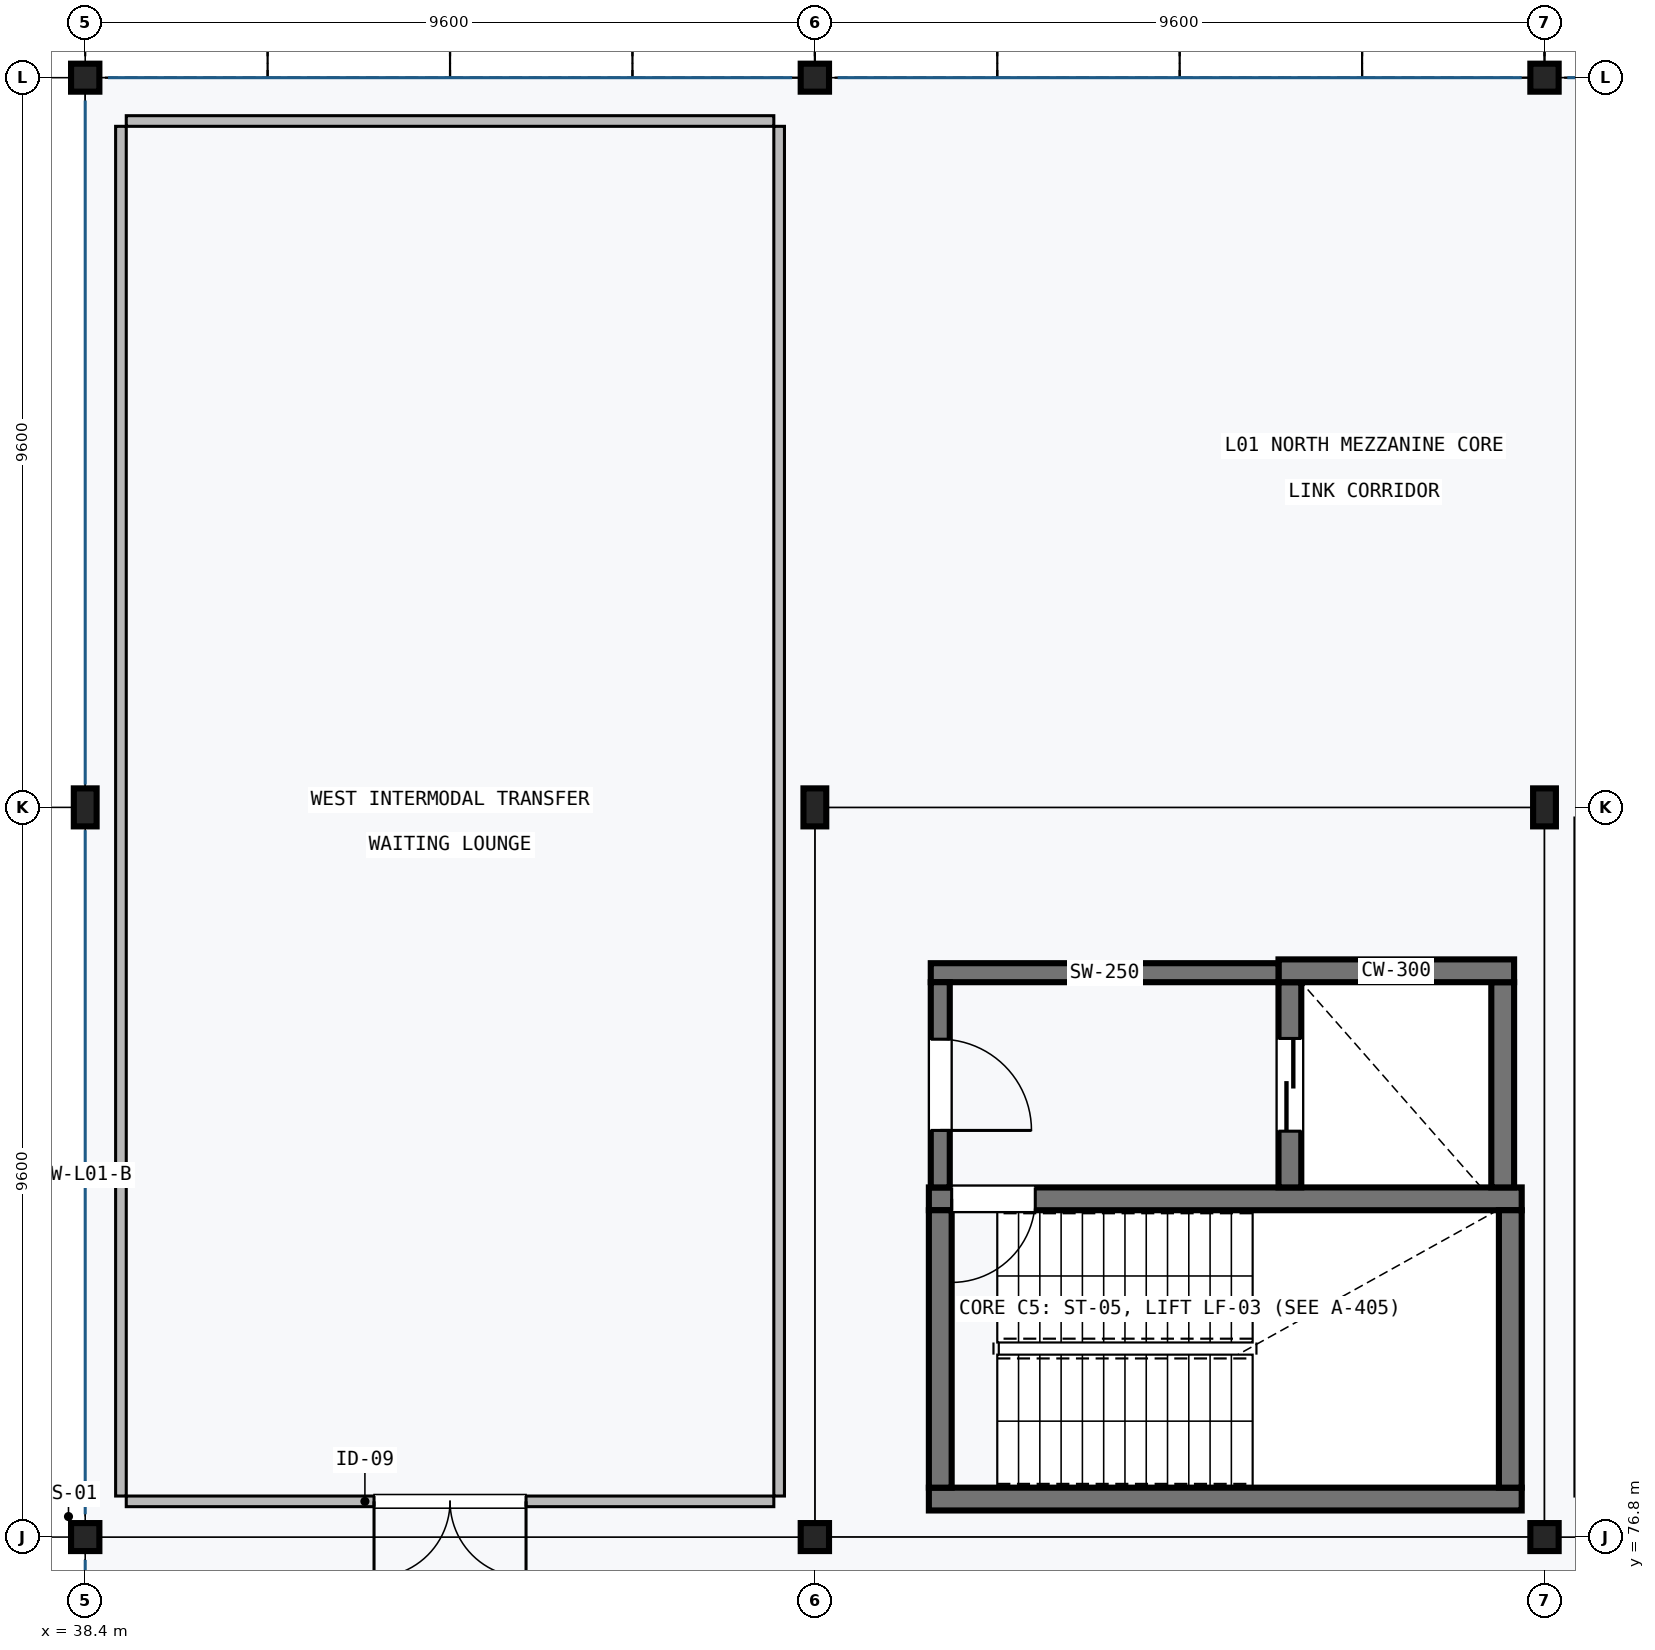
"""IFC4 building model, lengths in metres.
Left out: names, types, materials, properties, quantities, classifications, styles, units other than length and angle.
Written with IfcOpenShell. Run it as: python <this file> out.ifc"""

import sys

from ifc_helpers import new_model, si_unit, direction, frame, frame_2d, origin, origin_2d, place, context, subcontext, project, spatial, rectangle, i_section, extrude, element, fill, save


model = new_model("IFC4")
c1 = context("Model", 3, precision=1e-05, world=origin(), true_north=direction((0.0, 1.0)))
c2 = subcontext(c1, "Body", "Model", "MODEL_VIEW")
j1 = project(units=[si_unit("LENGTHUNIT", "METRE"), si_unit("PLANEANGLEUNIT", "RADIAN")], contexts=[c1])
p1 = place(None, origin())
s1 = spatial("IfcSite", under=j1, at=p1, CompositionType="ELEMENT")
p2 = place(p1, origin())
s2 = spatial("IfcBuilding", under=s1, at=p2, CompositionType="ELEMENT")
p3 = place(p2, frame((0.0, 0.0, 6.0)))
s3 = spatial("IfcBuildingStorey", under=s2, at=p3, CompositionType="ELEMENT", Elevation=6.0)
p4 = place(p3, frame((38.4, 76.8, 0.0), z_axis=(0.0, 0.0, 1.0), x_axis=(1.0, 0.0, 0.0)))
e1 = element("IfcColumn", 1, at=p4, inside=s3, PredefinedType="COLUMN", context=c2, shape_type="SweptSolid", body=[
    extrude(i_section(OverallWidth=0.373, OverallDepth=0.368, WebThickness=0.014, FlangeThickness=0.024, FilletRadius=0.015, at=origin_2d()), origin(), (0.0, 0.0, 1.0), 4.25),
])
p5 = place(p3, frame((38.4, 86.4, 0.0), z_axis=(0.0, 0.0, 1.0), x_axis=(1.0, 0.0, 0.0)))
e2 = element("IfcColumn", 2, at=p5, inside=s3, PredefinedType="COLUMN", context=c2, shape_type="SweptSolid", body=[
    extrude(i_section(OverallWidth=0.3, OverallDepth=0.5, WebThickness=0.014, FlangeThickness=0.028, FilletRadius=0.027, at=origin_2d()), origin(), (0.0, 0.0, 1.0), 4.25),
])
for number, where, z_axis, x_axis in (
    (3, (38.4, 96.0, 0.0), (0.0, 0.0, 1.0), (1.0, 0.0, 0.0)),
    (4, (48.0, 76.8, 0.0), (0.0, 0.0, 1.0), (1.0, 0.0, 0.0)),
):
    element("IfcColumn", number, at=place(p3, frame(where, z_axis=z_axis, x_axis=x_axis)), inside=s3, PredefinedType="COLUMN", context=c2, shape_type="SweptSolid", body=[
        extrude(i_section(OverallWidth=0.373, OverallDepth=0.368, WebThickness=0.014, FlangeThickness=0.024, FilletRadius=0.015, at=origin_2d()), origin(), (0.0, 0.0, 1.0), 4.25),
    ])
p6 = place(p3, frame((48.0, 86.4, 0.0), z_axis=(0.0, 0.0, 1.0), x_axis=(1.0, 0.0, 0.0)))
e5 = element("IfcColumn", 5, at=p6, inside=s3, PredefinedType="COLUMN", context=c2, shape_type="SweptSolid", body=[
    extrude(i_section(OverallWidth=0.3, OverallDepth=0.5, WebThickness=0.014, FlangeThickness=0.028, FilletRadius=0.027, at=origin_2d()), origin(), (0.0, 0.0, 1.0), 4.25),
])
for number, where, z_axis, x_axis in (
    (6, (48.0, 96.0, 0.0), (0.0, 0.0, 1.0), (1.0, 0.0, 0.0)),
    (7, (57.6, 76.8, 0.0), (0.0, 0.0, 1.0), (1.0, 0.0, 0.0)),
):
    element("IfcColumn", number, at=place(p3, frame(where, z_axis=z_axis, x_axis=x_axis)), inside=s3, PredefinedType="COLUMN", context=c2, shape_type="SweptSolid", body=[
        extrude(i_section(OverallWidth=0.373, OverallDepth=0.368, WebThickness=0.014, FlangeThickness=0.024, FilletRadius=0.015, at=origin_2d()), origin(), (0.0, 0.0, 1.0), 4.25),
    ])
p7 = place(p3, frame((57.6, 86.4, 0.0), z_axis=(0.0, 0.0, 1.0), x_axis=(1.0, 0.0, 0.0)))
e8 = element("IfcColumn", 8, at=p7, inside=s3, PredefinedType="COLUMN", context=c2, shape_type="SweptSolid", body=[
    extrude(i_section(OverallWidth=0.3, OverallDepth=0.5, WebThickness=0.014, FlangeThickness=0.028, FilletRadius=0.027, at=origin_2d()), origin(), (0.0, 0.0, 1.0), 4.25),
])
p8 = place(p3, frame((57.6, 96.0, 0.0), z_axis=(0.0, 0.0, 1.0), x_axis=(1.0, 0.0, 0.0)))
e9 = element("IfcColumn", 9, at=p8, inside=s3, PredefinedType="COLUMN", context=c2, shape_type="SweptSolid", body=[
    extrude(i_section(OverallWidth=0.373, OverallDepth=0.368, WebThickness=0.014, FlangeThickness=0.024, FilletRadius=0.015, at=origin_2d()), origin(), (0.0, 0.0, 1.0), 4.25),
])
p9 = place(p3, frame((49.5, 77.3, 0.0), z_axis=(0.0, 0.0, 1.0), x_axis=(1.0, 0.0, 0.0)))
e10 = element("IfcWall", 10, at=p9, inside=s3, PredefinedType="SHEAR", context=c2, shape_type="SweptSolid", body=[
    extrude(rectangle(XDim=7.8, YDim=0.3, at=frame_2d((3.9, 0.0))), origin(), (0.0, 0.0, 1.0), 4.25),
])
p10 = place(p3, frame((57.3, 81.25, 0.0), z_axis=(0.0, 0.0, 1.0), x_axis=(-1.0, 0.0, 0.0)))
e11 = element("IfcWall", 11, at=p10, inside=s3, PredefinedType="SHEAR", context=c2, shape_type="SweptSolid", body=[
    extrude(rectangle(XDim=7.8, YDim=0.3, at=frame_2d((3.9, 0.0))), origin(), (0.0, 0.0, 1.0), 4.25),
])
p11 = place(p10, frame((6.4, 0.0, 0.0)))
e12 = element("IfcOpeningElement", 12, at=p11, cuts=e11, PredefinedType="OPENING", context=c2, shape_type="SweptSolid", body=[
    extrude(rectangle(XDim=1.1, YDim=2.15, at=frame_2d((0.55, 1.075))), frame((0.0, 0.16, 0.0), z_axis=(0.0, -1.0, 0.0), x_axis=(1.0, 0.0, 0.0)), (0.0, 0.0, 1.0), 0.32),
])
for number, where, z_axis, x_axis in (
    (13, (49.65, 77.45, 0.0), (0.0, 0.0, 1.0), (0.0, 1.0, 0.0)),
    (14, (57.15, 81.1, 0.0), (0.0, 0.0, 1.0), (0.0, -1.0, 0.0)),
):
    element("IfcWall", number, at=place(p3, frame(where, z_axis=z_axis, x_axis=x_axis)), inside=s3, PredefinedType="SHEAR", context=c2, shape_type="SweptSolid", body=[
        extrude(rectangle(XDim=3.65, YDim=0.3, at=frame_2d((1.825, 0.0))), origin(), (0.0, 0.0, 1.0), 4.25),
    ])
p12 = place(p3, frame((54.25, 84.1, 0.0), z_axis=(0.0, 0.0, 1.0), x_axis=(0.0, -1.0, 0.0)))
e15 = element("IfcWall", 15, at=p12, inside=s3, PredefinedType="SHEAR", context=c2, shape_type="SweptSolid", body=[
    extrude(rectangle(XDim=2.7, YDim=0.3, at=frame_2d((1.35, 0.0))), origin(), (0.0, 0.0, 1.0), 4.25),
])
p13 = place(p12, frame((0.74, 0.0, 0.0)))
e16 = element("IfcOpeningElement", 16, at=p13, cuts=e15, PredefinedType="OPENING", context=c2, shape_type="SweptSolid", body=[
    extrude(rectangle(XDim=1.22, YDim=2.15, at=frame_2d((0.61, 1.075))), frame((0.0, 0.16, 0.0), z_axis=(0.0, -1.0, 0.0), x_axis=(1.0, 0.0, 0.0)), (0.0, 0.0, 1.0), 0.32),
])
p14 = place(p3, frame((57.05, 81.4, 0.0), z_axis=(0.0, 0.0, 1.0), x_axis=(0.0, 1.0, 0.0)))
e17 = element("IfcWall", 17, at=p14, inside=s3, PredefinedType="SHEAR", context=c2, shape_type="SweptSolid", body=[
    extrude(rectangle(XDim=2.7, YDim=0.3, at=frame_2d((1.35, 0.0))), origin(), (0.0, 0.0, 1.0), 4.25),
])
p15 = place(p3, frame((54.1, 84.25, 0.0), z_axis=(0.0, 0.0, 1.0), x_axis=(1.0, 0.0, 0.0)))
e18 = element("IfcWall", 18, at=p15, inside=s3, PredefinedType="SHEAR", context=c2, shape_type="SweptSolid", body=[
    extrude(rectangle(XDim=3.1, YDim=0.3, at=frame_2d((1.55, 0.0))), origin(), (0.0, 0.0, 1.0), 4.25),
])
p16 = place(p3, frame((54.1, 84.225, 0.0), z_axis=(0.0, 0.0, 1.0), x_axis=(-1.0, 0.0, 0.0)))
e19 = element("IfcWall", 19, at=p16, inside=s3, PredefinedType="SHEAR", context=c2, shape_type="SweptSolid", body=[
    extrude(rectangle(XDim=4.575, YDim=0.25, at=frame_2d((2.288, 0.0))), origin(), (0.0, 0.0, 1.0), 4.25),
])
p17 = place(p3, frame((49.65, 81.4, 0.0), z_axis=(0.0, 0.0, 1.0), x_axis=(0.0, 1.0, 0.0)))
e20 = element("IfcWall", 20, at=p17, inside=s3, PredefinedType="SHEAR", context=c2, shape_type="SweptSolid", body=[
    extrude(rectangle(XDim=2.7, YDim=0.25, at=frame_2d((1.35, 0.0))), origin(), (0.0, 0.0, 1.0), 4.25),
])
p18 = place(p17, frame((0.75, 0.0, 0.0)))
e21 = element("IfcOpeningElement", 21, at=p18, cuts=e20, PredefinedType="OPENING", context=c2, shape_type="SweptSolid", body=[
    extrude(rectangle(XDim=1.2, YDim=2.15, at=frame_2d((0.6, 1.075))), frame((0.0, 0.135, 0.0), z_axis=(0.0, -1.0, 0.0), x_axis=(1.0, 0.0, 0.0)), (0.0, 0.0, 1.0), 0.27),
])
p19 = place(p3, frame((47.46, 77.27, 0.0), z_axis=(0.0, 0.0, 1.0), x_axis=(-1.0, 0.0, 0.0)))
e22 = element("IfcWall", 22, at=p19, inside=s3, PredefinedType="PARTITIONING", context=c2, shape_type="SweptSolid", body=[
    extrude(rectangle(XDim=8.52, YDim=0.14, at=frame_2d((4.26, 0.0))), origin(), (0.0, 0.0, 1.0), 3.89),
])
p20 = place(p19, frame((3.26, 0.0, 0.0)))
e23 = element("IfcOpeningElement", 23, at=p20, cuts=e22, PredefinedType="OPENING", context=c2, shape_type="SweptSolid", body=[
    extrude(rectangle(XDim=2.0, YDim=2.4, at=frame_2d((1.0, 1.2))), frame((0.0, 0.08, 0.0), z_axis=(0.0, -1.0, 0.0), x_axis=(1.0, 0.0, 0.0)), (0.0, 0.0, 1.0), 0.16),
])
p21 = place(p3, frame((38.94, 95.43, 0.0), z_axis=(0.0, 0.0, 1.0), x_axis=(1.0, 0.0, 0.0)))
e24 = element("IfcWall", 24, at=p21, inside=s3, PredefinedType="PARTITIONING", context=c2, shape_type="SweptSolid", body=[
    extrude(rectangle(XDim=8.52, YDim=0.14, at=frame_2d((4.26, 0.0))), origin(), (0.0, 0.0, 1.0), 3.89),
])
for number, where, z_axis, x_axis in (
    (25, (38.87, 77.34, 0.0), (0.0, 0.0, 1.0), (0.0, 1.0, 0.0)),
    (26, (47.53, 95.36, 0.0), (0.0, 0.0, 1.0), (0.0, -1.0, 0.0)),
):
    element("IfcWall", number, at=place(p3, frame(where, z_axis=z_axis, x_axis=x_axis)), inside=s3, PredefinedType="PARTITIONING", context=c2, shape_type="SweptSolid", body=[
        extrude(rectangle(XDim=18.02, YDim=0.14, at=frame_2d((9.01, 0.0))), origin(), (0.0, 0.0, 1.0), 3.556),
    ])
p22 = place(p11, origin())
e27 = element("IfcDoor", 27, at=p22, inside=s3, OperationType="SINGLE_SWING_RIGHT", PredefinedType="DOOR", context=c2, shape_type="SweptSolid", body=[
    extrude(rectangle(XDim=1.1, YDim=2.15, at=frame_2d((0.55, 1.075))), frame((0.0, 0.025, 0.0), z_axis=(0.0, -1.0, 0.0), x_axis=(1.0, 0.0, 0.0)), (0.0, 0.0, 1.0), 0.05),
])
fill(e12, e27)
p23 = place(p13, frame((1.22, 0.0, 0.0), z_axis=(0.0, 0.0, 1.0), x_axis=(-1.0, 0.0, 0.0)))
e28 = element("IfcDoor", 28, at=p23, inside=s3, OperationType="DOUBLE_DOOR_SLIDING", PredefinedType="DOOR", context=c2, shape_type="SweptSolid", body=[
    extrude(rectangle(XDim=1.22, YDim=2.15, at=frame_2d((0.61, 1.075))), frame((0.0, 0.025, 0.0), z_axis=(0.0, -1.0, 0.0), x_axis=(1.0, 0.0, 0.0)), (0.0, 0.0, 1.0), 0.05),
])
fill(e16, e28)
p24 = place(p18, frame((1.2, 0.0, 0.0), z_axis=(0.0, 0.0, 1.0), x_axis=(-1.0, 0.0, 0.0)))
e29 = element("IfcDoor", 29, at=p24, inside=s3, OperationType="SINGLE_SWING_LEFT", PredefinedType="DOOR", context=c2, shape_type="SweptSolid", body=[
    extrude(rectangle(XDim=1.2, YDim=2.15, at=frame_2d((0.6, 1.075))), frame((0.0, 0.025, 0.0), z_axis=(0.0, -1.0, 0.0), x_axis=(1.0, 0.0, 0.0)), (0.0, 0.0, 1.0), 0.05),
])
fill(e21, e29)
p25 = place(p20, origin())
e30 = element("IfcDoor", 30, at=p25, inside=s3, OperationType="DOUBLE_DOOR_SINGLE_SWING", PredefinedType="DOOR", context=c2, shape_type="SweptSolid", body=[
    extrude(rectangle(XDim=2.0, YDim=2.4, at=frame_2d((1.0, 1.2))), frame((0.0, 0.025, 0.0), z_axis=(0.0, -1.0, 0.0), x_axis=(1.0, 0.0, 0.0)), (0.0, 0.0, 1.0), 0.05),
])
fill(e23, e30)
save(model, sys.argv[1])
